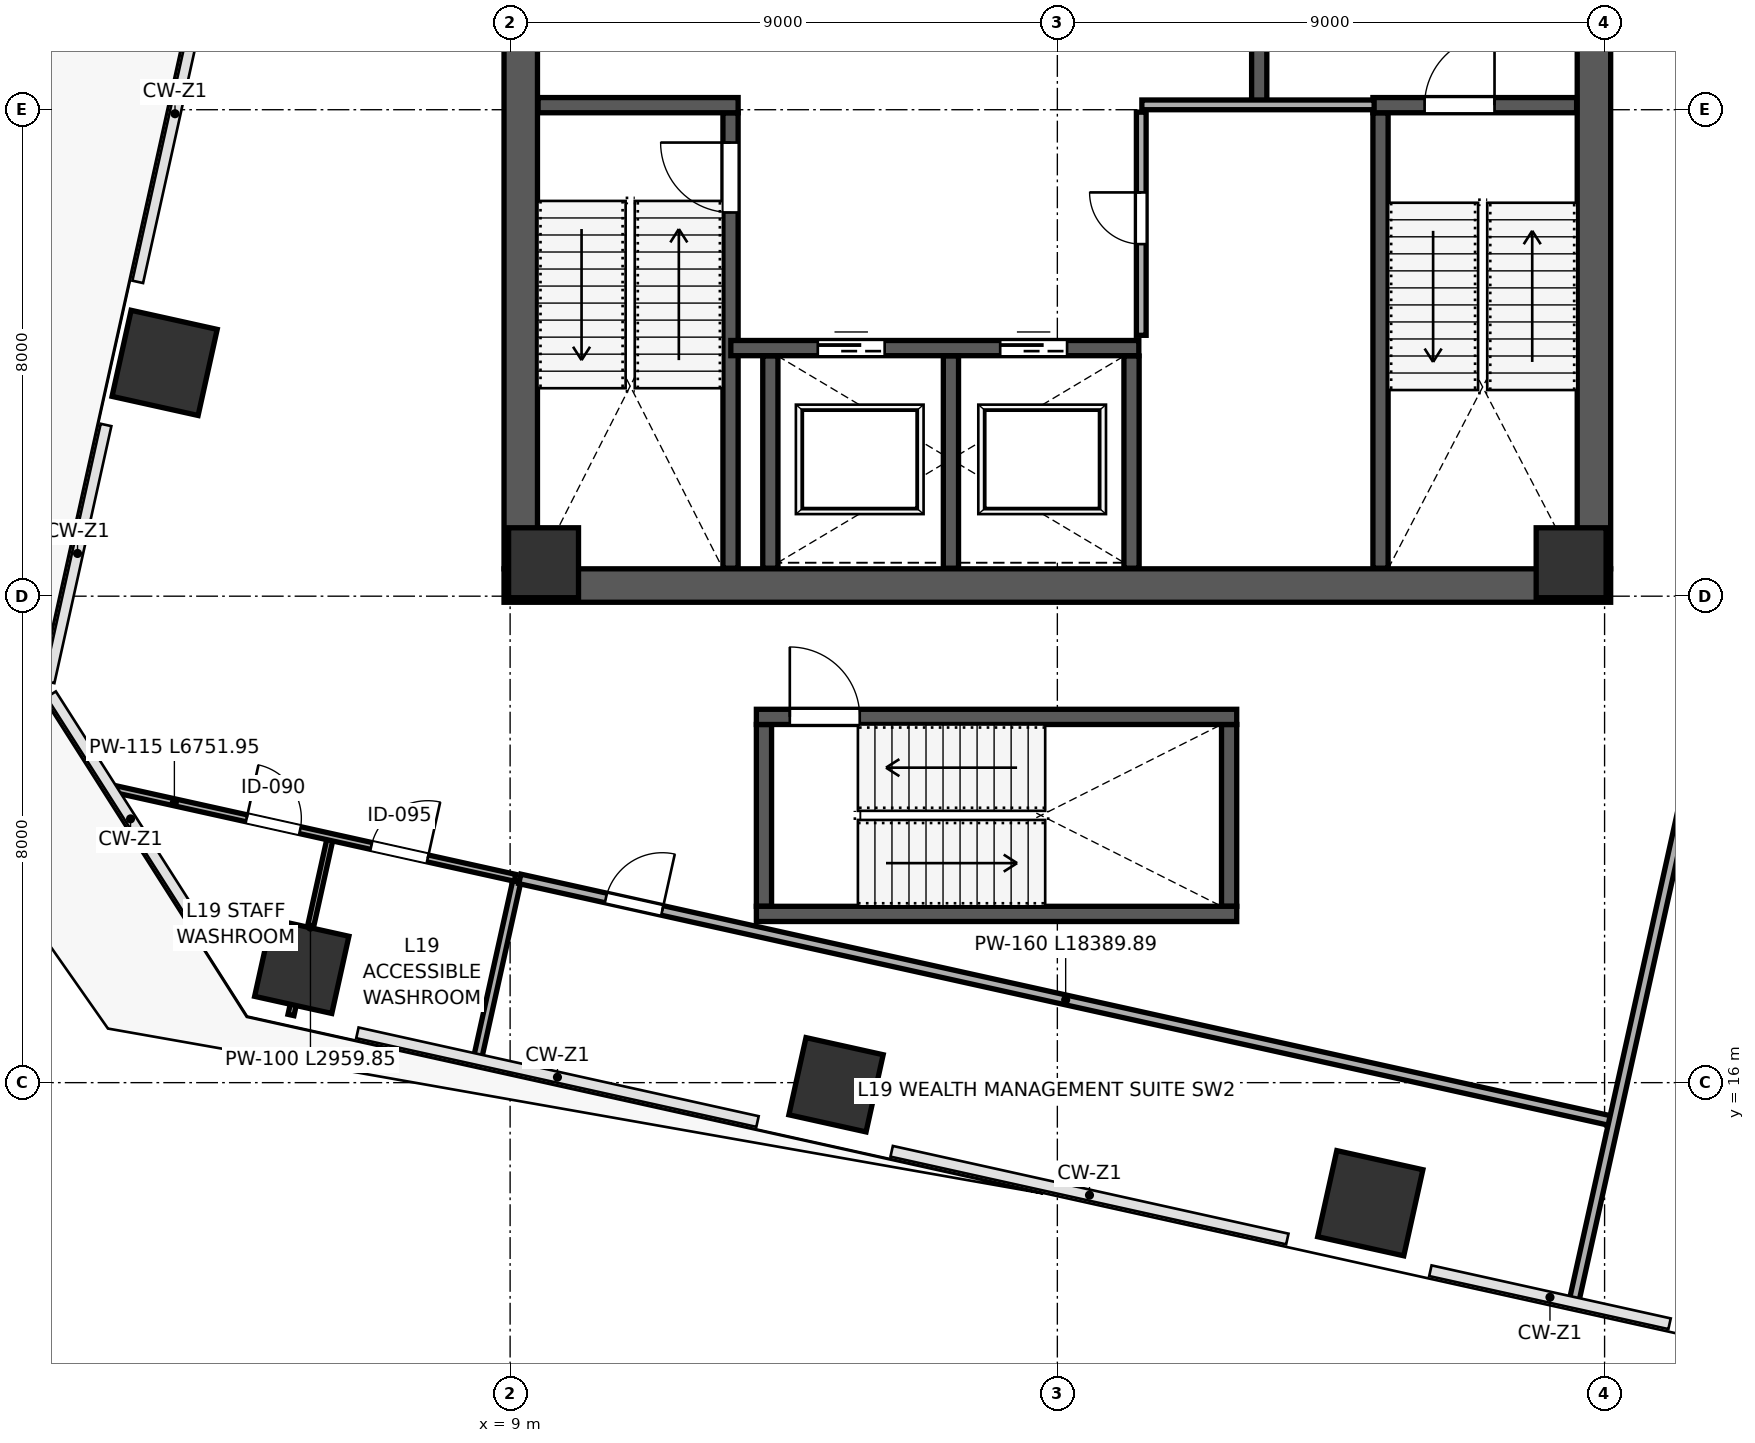
"""IFC4 building model, lengths in metres.
Left out: names, types, materials, properties, quantities, classifications, styles, units other than length and angle.
Written with IfcOpenShell. Run it as: python <this file> out.ifc"""

import sys

from ifc_helpers import new_model, si_unit, direction, frame, frame_2d, origin, origin_2d, place, context, subcontext, project, spatial, rectangle, extrude, source, transform, mapped, element, fill, save


model = new_model("IFC4")
c1 = context("Model", 3, precision=1e-05, world=origin(), true_north=direction((0.0, 1.0)))
c2 = subcontext(c1, "Body", "Model", "MODEL_VIEW")
j1 = project(units=[si_unit("LENGTHUNIT", "METRE"), si_unit("PLANEANGLEUNIT", "RADIAN")], contexts=[c1])
p1 = place(None, origin())
s1 = spatial("IfcSite", under=j1, at=p1, CompositionType="ELEMENT")
p2 = place(p1, origin())
s2 = spatial("IfcBuilding", under=s1, at=p2, CompositionType="ELEMENT")
p3 = place(p2, frame((0.0, 0.0, 87.4)))
s3 = spatial("IfcBuildingStorey", under=s2, at=p3, CompositionType="ELEMENT", Elevation=87.4)
m1 = source(origin(), c2, "Body", "SweptSolid", [
    extrude(rectangle(XDim=1.15, YDim=1.15, at=origin_2d()), origin(), (0.0, 0.0, 1.0), 4.199),
])
for number, where, z_axis, x_axis in (
    (1, (9.55, 24.55, 0.001), (0.0, 0.0, 1.0), (1.0, 0.0, 0.0)),
    (2, (26.45, 24.55, 0.001), (0.0, 0.0, 1.0), (1.0, 0.0, 0.0)),
):
    element("IfcColumn", number, at=place(p3, frame(where, z_axis=z_axis, x_axis=x_axis)), inside=s3, PredefinedType="COLUMN", context=c2, shape_type="MappedRepresentation", body=[
        mapped(m1, transform((0.0, 0.0, 0.0), scale=1.0)),
    ])
m2 = source(origin(), c2, "Body", "SweptSolid", [
    extrude(rectangle(XDim=1.3, YDim=1.3, at=origin_2d()), origin(), (0.0, 0.0, 1.0), 4.199),
])
for number, where, z_axis, x_axis in (
    (3, (5.573, 17.913, 0.001), (0.0, 0.0, 1.0), (-0.976, 0.216, 0.0)),
    (4, (14.36, 15.965, 0.001), (0.0, 0.0, 1.0), (-0.976, 0.216, 0.0)),
):
    element("IfcColumn", number, at=place(p3, frame(where, z_axis=z_axis, x_axis=x_axis)), inside=s3, PredefinedType="COLUMN", context=c2, shape_type="MappedRepresentation", body=[
        mapped(m2, transform((0.0, 0.0, 0.0), scale=1.0)),
    ])
m3 = source(origin(), c2, "Body", "SweptSolid", [
    extrude(rectangle(XDim=1.45, YDim=1.45, at=origin_2d()), origin(), (0.0, 0.0, 1.0), 4.199),
])
for number, where, z_axis, x_axis in (
    (5, (23.147, 14.017, 0.001), (0.0, 0.0, 1.0), (-0.976, 0.216, 0.0)),
    (6, (3.318, 27.837, 0.001), (0.0, 0.0, 1.0), (-0.976, 0.216, 0.0)),
):
    element("IfcColumn", number, at=place(p3, frame(where, z_axis=z_axis, x_axis=x_axis)), inside=s3, PredefinedType="COLUMN", context=c2, shape_type="MappedRepresentation", body=[
        mapped(m3, transform((0.0, 0.0, 0.0), scale=1.0)),
    ])
p4 = place(p3, frame((9.175, 24.45, 0.0), z_axis=(0.0, 0.0, 1.0), x_axis=(0.0, 1.0, 0.0)))
e7 = element("IfcWall", 7, at=p4, inside=s3, PredefinedType="SHEAR", context=c2, shape_type="SweptSolid", body=[
    extrude(rectangle(XDim=15.1, YDim=0.55, at=frame_2d((7.55, 0.0))), origin(), (0.0, 0.0, 1.0), 3.96),
])
p5 = place(p3, frame((26.825, 24.45, 0.0), z_axis=(0.0, 0.0, 1.0), x_axis=(0.0, 1.0, 0.0)))
e8 = element("IfcWall", 8, at=p5, inside=s3, PredefinedType="SHEAR", context=c2, shape_type="SweptSolid", body=[
    extrude(rectangle(XDim=15.1, YDim=0.55, at=frame_2d((7.55, 0.0))), origin(), (0.0, 0.0, 1.0), 3.96),
])
p6 = place(p5, frame((8.6, 0.0, 0.0)))
e9 = element("IfcOpeningElement", 9, at=p6, cuts=e8, PredefinedType="OPENING", context=c2, shape_type="SweptSolid", body=[
    extrude(rectangle(XDim=1.15, YDim=2.2, at=frame_2d((0.575, 1.1))), frame((0.0, 0.285, 0.0), z_axis=(0.0, -1.0, 0.0), x_axis=(1.0, 0.0, 0.0)), (0.0, 0.0, 1.0), 0.57),
])
p7 = place(p3, frame((8.9, 24.175, 0.0), z_axis=(0.0, 0.0, 1.0), x_axis=(1.0, 0.0, 0.0)))
e10 = element("IfcWall", 10, at=p7, inside=s3, PredefinedType="SHEAR", context=c2, shape_type="SweptSolid", body=[
    extrude(rectangle(XDim=18.2, YDim=0.55, at=frame_2d((9.1, 0.0))), origin(), (0.0, 0.0, 1.0), 3.96),
])
p8 = place(p3, frame((12.625, 24.46, 0.0), z_axis=(0.0, 0.0, 1.0), x_axis=(0.0, 1.0, 0.0)))
e11 = element("IfcWall", 11, at=p8, inside=s3, PredefinedType="SHEAR", context=c2, shape_type="SweptSolid", body=[
    extrude(rectangle(XDim=7.49, YDim=0.25, at=frame_2d((3.745, 0.0))), origin(), (0.0, 0.0, 1.0), 3.96),
])
p9 = place(p8, frame((5.85, 0.0, 0.0)))
e12 = element("IfcOpeningElement", 12, at=p9, cuts=e11, PredefinedType="OPENING", context=c2, shape_type="SweptSolid", body=[
    extrude(rectangle(XDim=1.15, YDim=2.2, at=frame_2d((0.575, 1.1))), frame((0.0, 0.135, 0.0), z_axis=(0.0, -1.0, 0.0), x_axis=(1.0, 0.0, 0.0)), (0.0, 0.0, 1.0), 0.27),
])
p10 = place(p3, frame((9.46, 32.075, 0.0), z_axis=(0.0, 0.0, 1.0), x_axis=(1.0, 0.0, 0.0)))
e13 = element("IfcWall", 13, at=p10, inside=s3, PredefinedType="SHEAR", context=c2, shape_type="SweptSolid", body=[
    extrude(rectangle(XDim=3.29, YDim=0.25, at=frame_2d((1.645, 0.0))), origin(), (0.0, 0.0, 1.0), 3.96),
])
p11 = place(p3, frame((23.315, 24.46, 0.0), z_axis=(0.0, 0.0, 1.0), x_axis=(0.0, 1.0, 0.0)))
e14 = element("IfcWall", 14, at=p11, inside=s3, PredefinedType="SHEAR", context=c2, shape_type="SweptSolid", body=[
    extrude(rectangle(XDim=7.49, YDim=0.25, at=frame_2d((3.745, 0.0))), origin(), (0.0, 0.0, 1.0), 3.96),
])
p12 = place(p3, frame((23.19, 32.075, 0.0), z_axis=(0.0, 0.0, 1.0), x_axis=(1.0, 0.0, 0.0)))
e15 = element("IfcWall", 15, at=p12, inside=s3, PredefinedType="SHEAR", context=c2, shape_type="SweptSolid", body=[
    extrude(rectangle(XDim=3.35, YDim=0.25, at=frame_2d((1.675, 0.0))), origin(), (0.0, 0.0, 1.0), 3.96),
])
p13 = place(p12, frame((0.85, 0.0, 0.0)))
e16 = element("IfcOpeningElement", 16, at=p13, cuts=e15, PredefinedType="OPENING", context=c2, shape_type="SweptSolid", body=[
    extrude(rectangle(XDim=1.15, YDim=2.2, at=frame_2d((0.575, 1.1))), frame((0.0, 0.135, 0.0), z_axis=(0.0, -1.0, 0.0), x_axis=(1.0, 0.0, 0.0)), (0.0, 0.0, 1.0), 0.27),
])
p14 = place(p3, frame((21.32, 32.12, 0.0), z_axis=(0.0, 0.0, 1.0), x_axis=(0.0, 1.0, 0.0)))
e17 = element("IfcWall", 17, at=p14, inside=s3, PredefinedType="SHEAR", context=c2, shape_type="SweptSolid", body=[
    extrude(rectangle(XDim=7.42, YDim=0.25, at=frame_2d((3.71, 0.0))), origin(), (0.0, 0.0, 1.0), 3.96),
])
p15 = place(p14, frame((1.4, 0.0, 0.0)))
e18 = element("IfcOpeningElement", 18, at=p15, cuts=e17, PredefinedType="OPENING", context=c2, shape_type="SweptSolid", body=[
    extrude(rectangle(XDim=1.15, YDim=2.2, at=frame_2d((0.575, 1.1))), frame((0.0, 0.135, 0.0), z_axis=(0.0, -1.0, 0.0), x_axis=(1.0, 0.0, 0.0)), (0.0, 0.0, 1.0), 0.27),
])
p16 = place(p3, frame((12.63, 28.08, 0.0), z_axis=(0.0, 0.0, 1.0), x_axis=(1.0, 0.0, 0.0)))
e19 = element("IfcWall", 19, at=p16, inside=s3, PredefinedType="SHEAR", context=c2, shape_type="SweptSolid", body=[
    extrude(rectangle(XDim=6.71, YDim=0.25, at=frame_2d((3.355, 0.0))), origin(), (0.0, 0.0, 1.0), 3.96),
])
p17 = place(p16, frame((1.43, 0.0, 0.0)))
e20 = element("IfcOpeningElement", 20, at=p17, cuts=e19, PredefinedType="OPENING", context=c2, shape_type="SweptSolid", body=[
    extrude(rectangle(XDim=1.1, YDim=2.2, at=frame_2d((0.55, 1.1))), frame((0.0, 0.135, 0.0), z_axis=(0.0, -1.0, 0.0), x_axis=(1.0, 0.0, 0.0)), (0.0, 0.0, 1.0), 0.27),
])
p18 = place(p16, frame((4.43, 0.0, 0.0)))
e21 = element("IfcOpeningElement", 21, at=p18, cuts=e19, PredefinedType="OPENING", context=c2, shape_type="SweptSolid", body=[
    extrude(rectangle(XDim=1.1, YDim=2.2, at=frame_2d((0.55, 1.1))), frame((0.0, 0.135, 0.0), z_axis=(0.0, -1.0, 0.0), x_axis=(1.0, 0.0, 0.0)), (0.0, 0.0, 1.0), 0.27),
])
for number, where, z_axis, x_axis in (
    (22, (13.28, 24.46, 0.0), (0.0, 0.0, 1.0), (0.0, 1.0, 0.0)),
    (23, (16.25, 24.46, 0.0), (0.0, 0.0, 1.0), (0.0, 1.0, 0.0)),
    (24, (19.22, 24.46, 0.0), (0.0, 0.0, 1.0), (0.0, 1.0, 0.0)),
):
    element("IfcWall", number, at=place(p3, frame(where, z_axis=z_axis, x_axis=x_axis)), inside=s3, PredefinedType="SHEAR", context=c2, shape_type="SweptSolid", body=[
        extrude(rectangle(XDim=3.49, YDim=0.25, at=frame_2d((1.745, 0.0))), origin(), (0.0, 0.0, 1.0), 3.96),
    ])
for number, where, z_axis, x_axis in (
    (25, (13.175, 18.9, 0.0), (0.0, 0.0, 1.0), (0.0, 1.0, 0.0)),
    (26, (20.825, 18.9, 0.0), (0.0, 0.0, 1.0), (0.0, 1.0, 0.0)),
):
    element("IfcWall", number, at=place(p3, frame(where, z_axis=z_axis, x_axis=x_axis)), inside=s3, PredefinedType="SHEAR", context=c2, shape_type="SweptSolid", body=[
        extrude(rectangle(XDim=2.99, YDim=0.25, at=frame_2d((1.495, 0.0))), origin(), (0.0, 0.0, 1.0), 3.96),
    ])
p19 = place(p3, frame((13.05, 18.775, 0.0), z_axis=(0.0, 0.0, 1.0), x_axis=(1.0, 0.0, 0.0)))
e27 = element("IfcWall", 27, at=p19, inside=s3, PredefinedType="SHEAR", context=c2, shape_type="SweptSolid", body=[
    extrude(rectangle(XDim=7.9, YDim=0.25, at=frame_2d((3.95, 0.0))), origin(), (0.0, 0.0, 1.0), 3.96),
])
p20 = place(p3, frame((13.05, 22.015, 0.0), z_axis=(0.0, 0.0, 1.0), x_axis=(1.0, 0.0, 0.0)))
e28 = element("IfcWall", 28, at=p20, inside=s3, PredefinedType="SHEAR", context=c2, shape_type="SweptSolid", body=[
    extrude(rectangle(XDim=7.9, YDim=0.25, at=frame_2d((3.95, 0.0))), origin(), (0.0, 0.0, 1.0), 3.96),
])
p21 = place(p20, frame((0.55, 0.0, 0.0)))
e29 = element("IfcOpeningElement", 29, at=p21, cuts=e28, PredefinedType="OPENING", context=c2, shape_type="SweptSolid", body=[
    extrude(rectangle(XDim=1.15, YDim=2.2, at=frame_2d((0.575, 1.1))), frame((0.0, 0.135, 0.0), z_axis=(0.0, -1.0, 0.0), x_axis=(1.0, 0.0, 0.0)), (0.0, 0.0, 1.0), 0.27),
])
p22 = place(p3, frame((19.39, 32.08, 0.0), z_axis=(0.0, 0.0, 1.0), x_axis=(1.0, 0.0, 0.0)))
e30 = element("IfcWall", 30, at=p22, inside=s3, PredefinedType="PARTITIONING", context=c2, shape_type="SweptSolid", body=[
    extrude(rectangle(XDim=3.82, YDim=0.16, at=frame_2d((1.91, 0.0))), origin(), (0.0, 0.0, 1.0), 3.96),
])
p23 = place(p3, frame((19.38, 28.29, 0.0), z_axis=(0.0, 0.0, 1.0), x_axis=(0.0, 1.0, 0.0)))
e31 = element("IfcWall", 31, at=p23, inside=s3, PredefinedType="PARTITIONING", context=c2, shape_type="SweptSolid", body=[
    extrude(rectangle(XDim=3.67, YDim=0.16, at=frame_2d((1.835, 0.0))), origin(), (0.0, 0.0, 1.0), 3.96),
])
p24 = place(p23, frame((1.5, 0.0, 0.0)))
e32 = element("IfcOpeningElement", 32, at=p24, cuts=e31, PredefinedType="OPENING", context=c2, shape_type="SweptSolid", body=[
    extrude(rectangle(XDim=0.85, YDim=2.1, at=frame_2d((0.425, 1.05))), frame((0.0, 0.09, 0.0), z_axis=(0.0, -1.0, 0.0), x_axis=(1.0, 0.0, 0.0)), (0.0, 0.0, 1.0), 0.18),
])
p25 = place(p3, frame((5.396, 17.113, 0.0), z_axis=(0.0, 0.0, 1.0), x_axis=(0.216441341477, 0.976295624132, 0.0)))
e33 = element("IfcWall", 33, at=p25, inside=s3, PredefinedType="PARTITIONING", context=c2, shape_type="SweptSolid", body=[
    extrude(rectangle(XDim=2.96, YDim=0.1, at=frame_2d((1.48, 0.0))), origin(), (0.0, 0.0, 1.0), 3.095),
])
p26 = place(p3, frame((8.471, 16.431, 0.0), z_axis=(0.0, 0.0, 1.0), x_axis=(0.216441341477, 0.976295624132, 0.0)))
e34 = element("IfcWall", 34, at=p26, inside=s3, PredefinedType="PARTITIONING", context=c2, shape_type="SweptSolid", body=[
    extrude(rectangle(XDim=2.96, YDim=0.135, at=frame_2d((1.48, 0.0))), origin(), (0.0, 0.0, 1.0), 3.095),
])
p27 = place(p3, frame((2.49, 20.83, 0.0), z_axis=(0.0, 0.0, 1.0), x_axis=(0.976294141914, -0.216448027167, 0.0)))
e35 = element("IfcWall", 35, at=p27, inside=s3, PredefinedType="PARTITIONING", context=c2, shape_type="SweptSolid", body=[
    extrude(rectangle(XDim=6.752, YDim=0.115, at=frame_2d((3.376, 0.0))), origin(), (0.0, 0.0, 1.0), 3.96),
])
p28 = place(p27, frame((2.23, 0.0, 0.0)))
e36 = element("IfcOpeningElement", 36, at=p28, cuts=e35, PredefinedType="OPENING", context=c2, shape_type="SweptSolid", body=[
    extrude(rectangle(XDim=0.9, YDim=2.15, at=frame_2d((0.45, 1.075))), frame((0.0, 0.067, 0.0), z_axis=(0.0, -1.0, 0.0), x_axis=(1.0, 0.0, 0.0)), (0.0, 0.0, 1.0), 0.135),
])
p29 = place(p27, frame((4.33, 0.0, 0.0)))
e37 = element("IfcOpeningElement", 37, at=p29, cuts=e35, PredefinedType="OPENING", context=c2, shape_type="SweptSolid", body=[
    extrude(rectangle(XDim=0.95, YDim=2.15, at=frame_2d((0.475, 1.075))), frame((0.0, 0.067, 0.0), z_axis=(0.0, -1.0, 0.0), x_axis=(1.0, 0.0, 0.0)), (0.0, 0.0, 1.0), 0.135),
])
p30 = place(p3, frame((9.16, 19.351, 0.0), z_axis=(0.0, 0.0, 1.0), x_axis=(0.97629657883, -0.216437035106, 0.0)))
e38 = element("IfcWall", 38, at=p30, inside=s3, PredefinedType="PARTITIONING", context=c2, shape_type="SweptSolid", body=[
    extrude(rectangle(XDim=18.39, YDim=0.16, at=frame_2d((9.195, 0.0))), origin(), (0.0, 0.0, 1.0), 3.96),
])
p31 = place(p30, frame((1.45, 0.0, 0.0)))
e39 = element("IfcOpeningElement", 39, at=p31, cuts=e38, PredefinedType="OPENING", context=c2, shape_type="SweptSolid", body=[
    extrude(rectangle(XDim=0.95, YDim=2.15, at=frame_2d((0.475, 1.075))), frame((0.0, 0.09, 0.0), z_axis=(0.0, -1.0, 0.0), x_axis=(1.0, 0.0, 0.0)), (0.0, 0.0, 1.0), 0.18),
])
p32 = place(p3, frame((26.504, 12.433, 0.0), z_axis=(0.0, 0.0, 1.0), x_axis=(0.216434476574, 0.976297146032, 0.0)))
e40 = element("IfcWall", 40, at=p32, inside=s3, PredefinedType="PARTITIONING", context=c2, shape_type="SweptSolid", body=[
    extrude(rectangle(XDim=20.38, YDim=0.16, at=frame_2d((10.19, 0.0))), origin(), (0.0, 0.0, 1.0), 3.96),
])
m4 = source(origin(), c2, "Body", "SweptSolid", [
    extrude(rectangle(XDim=1.15, YDim=2.2, at=frame_2d((0.575, 1.1))), frame((0.0, 0.025, 0.0), z_axis=(0.0, -1.0, 0.0), x_axis=(1.0, 0.0, 0.0)), (0.0, 0.0, 1.0), 0.05),
])
p33 = place(p9, origin())
e41 = element("IfcDoor", 41, at=p33, inside=s3, OperationType="SINGLE_SWING_RIGHT", PredefinedType="DOOR", context=c2, shape_type="MappedRepresentation", body=[
    mapped(m4, transform((0.0, 0.0, 0.0), scale=1.0)),
])
fill(e12, e41)
p34 = place(p13, origin())
e42 = element("IfcDoor", 42, at=p34, inside=s3, OperationType="SINGLE_SWING_RIGHT", PredefinedType="DOOR", context=c2, shape_type="MappedRepresentation", body=[
    mapped(m4, transform((0.0, 0.0, 0.0), scale=1.0)),
])
fill(e16, e42)
p35 = place(p21, origin())
e43 = element("IfcDoor", 43, at=p35, inside=s3, OperationType="SINGLE_SWING_LEFT", PredefinedType="DOOR", context=c2, shape_type="MappedRepresentation", body=[
    mapped(m4, transform((0.0, 0.0, 0.0), scale=1.0)),
])
fill(e29, e43)
m5 = source(origin(), c2, "Body", "SweptSolid", [
    extrude(rectangle(XDim=1.1, YDim=2.2, at=frame_2d((0.55, 1.1))), frame((0.0, 0.025, 0.0), z_axis=(0.0, -1.0, 0.0), x_axis=(1.0, 0.0, 0.0)), (0.0, 0.0, 1.0), 0.05),
])
p36 = place(p17, origin())
e44 = element("IfcDoor", 44, at=p36, inside=s3, OperationType="SLIDING_TO_LEFT", PredefinedType="DOOR", context=c2, shape_type="MappedRepresentation", body=[
    mapped(m5, transform((0.0, 0.0, 0.0), scale=1.0)),
])
fill(e20, e44)
p37 = place(p18, origin())
e45 = element("IfcDoor", 45, at=p37, inside=s3, OperationType="SLIDING_TO_RIGHT", PredefinedType="DOOR", context=c2, shape_type="MappedRepresentation", body=[
    mapped(m5, transform((0.0, 0.0, 0.0), scale=1.0)),
])
fill(e21, e45)
m6 = source(origin(), c2, "Body", "SweptSolid", [
    extrude(rectangle(XDim=0.85, YDim=2.1, at=frame_2d((0.425, 1.05))), frame((0.0, 0.025, 0.0), z_axis=(0.0, -1.0, 0.0), x_axis=(1.0, 0.0, 0.0)), (0.0, 0.0, 1.0), 0.05),
])
p38 = place(p24, origin())
e46 = element("IfcDoor", 46, at=p38, inside=s3, OperationType="SINGLE_SWING_RIGHT", PredefinedType="DOOR", context=c2, shape_type="MappedRepresentation", body=[
    mapped(m6, transform((0.0, 0.0, 0.0), scale=1.0)),
])
fill(e32, e46)
m7 = source(origin(), c2, "Body", "SweptSolid", [
    extrude(rectangle(XDim=0.9, YDim=2.15, at=frame_2d((0.45, 1.075))), frame((0.0, 0.025, 0.0), z_axis=(0.0, -1.0, 0.0), x_axis=(1.0, 0.0, 0.0)), (0.0, 0.0, 1.0), 0.05),
])
p39 = place(p28, origin())
e47 = element("IfcDoor", 47, at=p39, inside=s3, OperationType="SINGLE_SWING_LEFT", PredefinedType="DOOR", context=c2, shape_type="MappedRepresentation", body=[
    mapped(m7, transform((0.0, 0.0, 0.0), scale=1.0)),
])
fill(e36, e47)
m8 = source(origin(), c2, "Body", "SweptSolid", [
    extrude(rectangle(XDim=0.95, YDim=2.15, at=frame_2d((0.475, 1.075))), frame((0.0, 0.025, 0.0), z_axis=(0.0, -1.0, 0.0), x_axis=(1.0, 0.0, 0.0)), (0.0, 0.0, 1.0), 0.05),
])
p40 = place(p29, origin())
e48 = element("IfcDoor", 48, at=p40, inside=s3, OperationType="SINGLE_SWING_RIGHT", PredefinedType="DOOR", context=c2, shape_type="MappedRepresentation", body=[
    mapped(m8, transform((0.0, 0.0, 0.0), scale=1.0)),
])
fill(e37, e48)
m9 = source(origin(), c2, "Body", "SweptSolid", [
    extrude(rectangle(XDim=0.95, YDim=2.15, at=frame_2d((0.475, 1.075))), frame((0.0, 0.025, 0.0), z_axis=(0.0, -1.0, 0.0), x_axis=(1.0, 0.0, 0.0)), (0.0, 0.0, 1.0), 0.05),
])
p41 = place(p31, origin())
e49 = element("IfcDoor", 49, at=p41, inside=s3, OperationType="SINGLE_SWING_RIGHT", PredefinedType="DOOR", context=c2, shape_type="MappedRepresentation", body=[
    mapped(m9, transform((0.0, 0.0, 0.0), scale=1.0)),
])
fill(e39, e49)
save(model, sys.argv[1])
